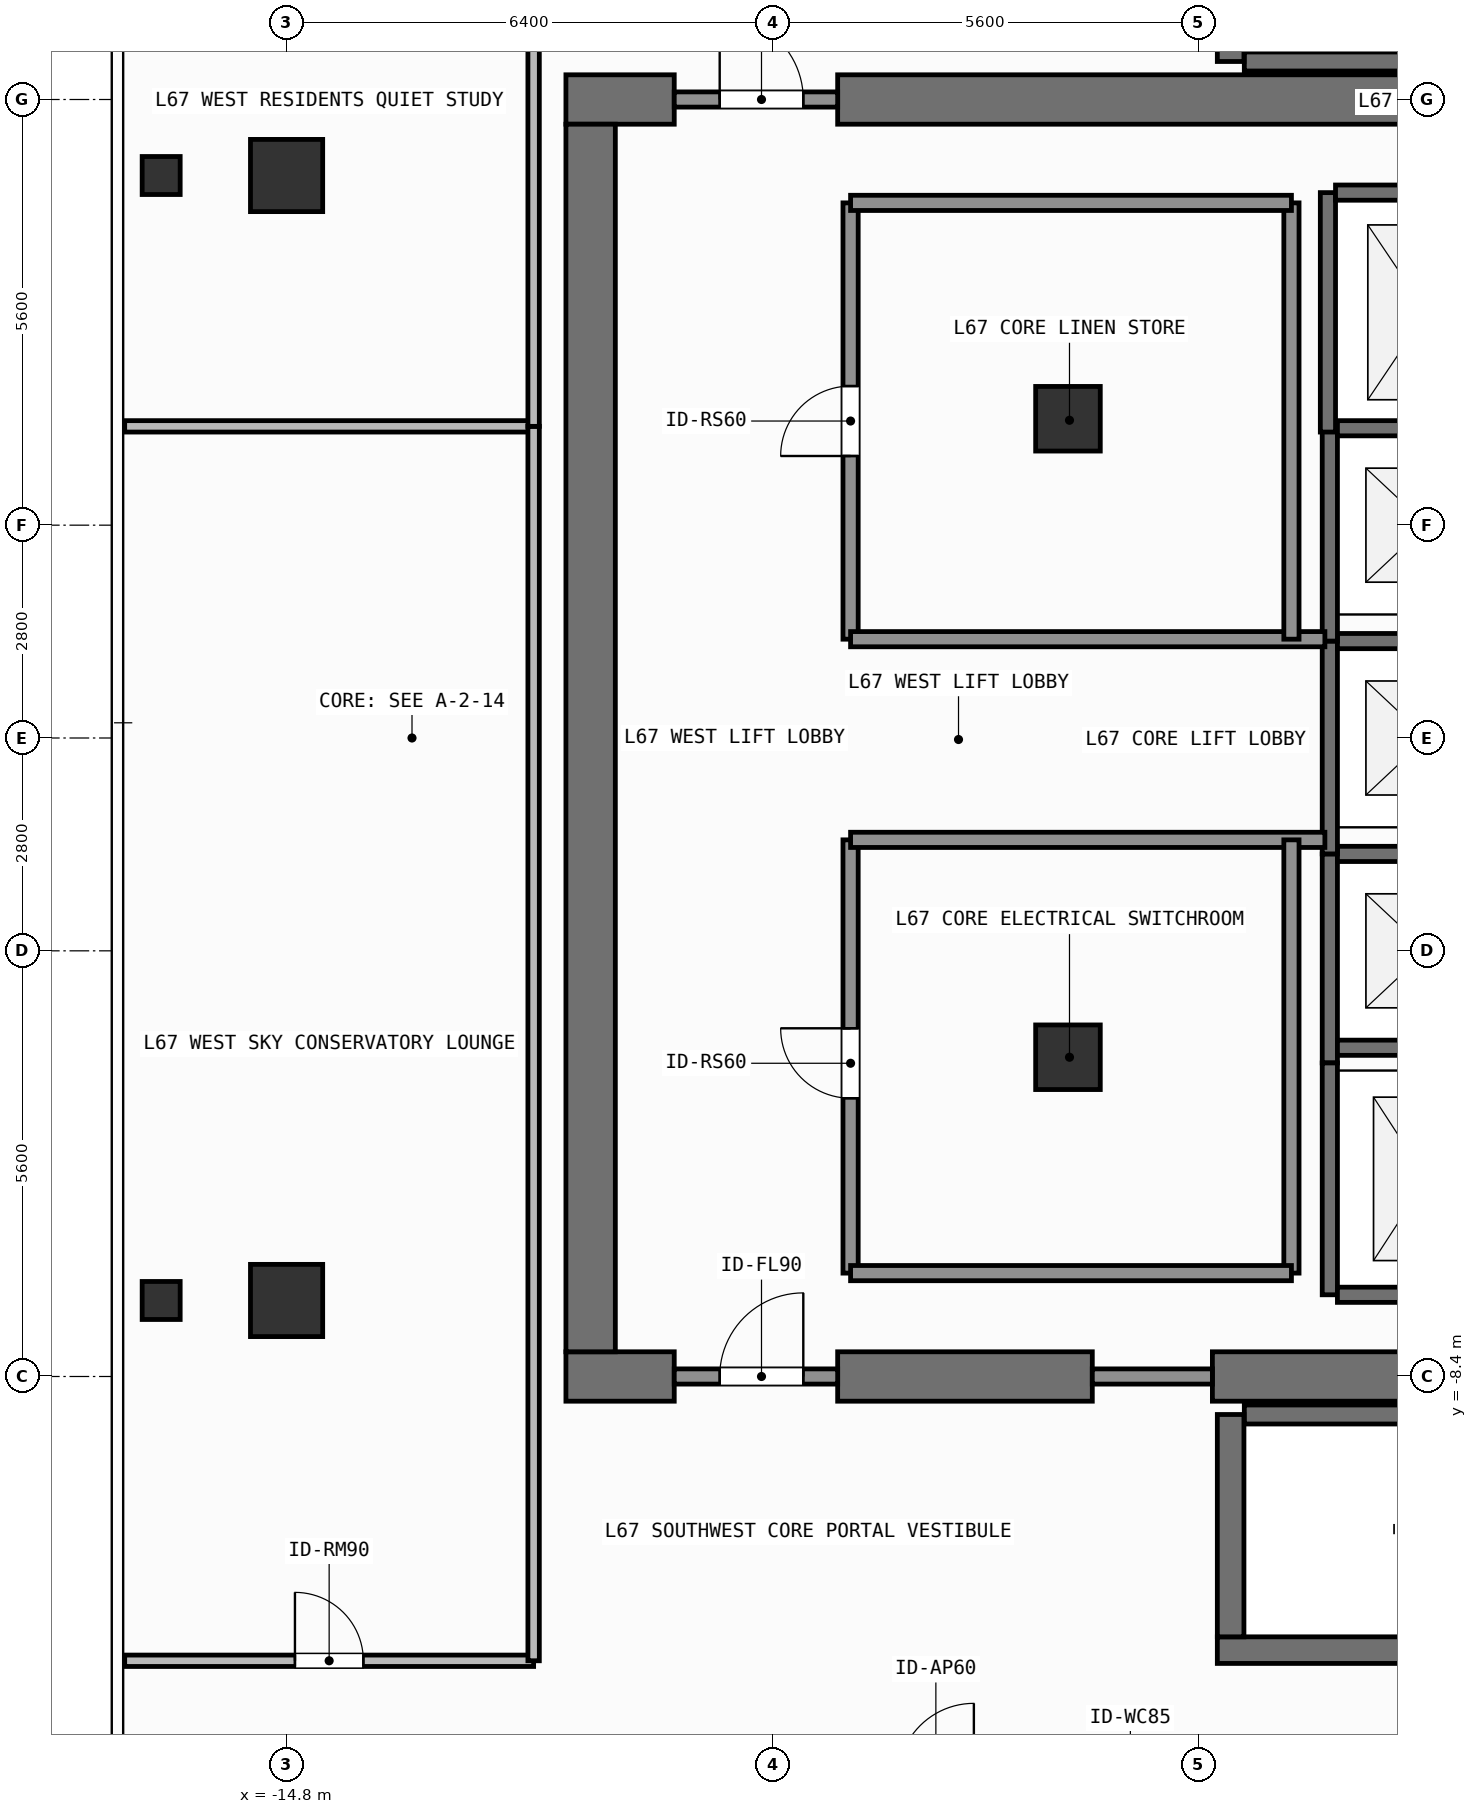
"""IFC4 building model, lengths in metres.
Left out: names, types, materials, properties, quantities, classifications, styles, units other than length and angle.
Written with IfcOpenShell. Run it as: python <this file> out.ifc"""

import sys

from ifc_helpers import new_model, si_unit, direction, frame, frame_2d, origin, origin_2d, place, context, subcontext, project, spatial, rectangle, hollow_rectangle, extrude, element, fill, save


model = new_model("IFC4")
c1 = context("Model", 3, precision=1e-05, world=origin(), true_north=direction((0.0, 1.0)))
c2 = subcontext(c1, "Body", "Model", "MODEL_VIEW")
j1 = project(units=[si_unit("LENGTHUNIT", "METRE"), si_unit("PLANEANGLEUNIT", "RADIAN")], contexts=[c1])
p1 = place(None, origin())
s1 = spatial("IfcSite", under=j1, at=p1, CompositionType="ELEMENT")
p2 = place(p1, origin())
s2 = spatial("IfcBuilding", under=s1, at=p2, CompositionType="ELEMENT")
p3 = place(p2, frame((0.0, 0.0, 274.2)))
s3 = spatial("IfcBuildingStorey", under=s2, at=p3, CompositionType="ELEMENT", Elevation=274.2)
p4 = place(p3, frame((-11.125, -8.4, 0.0), z_axis=(0.0, 0.0, 1.0), x_axis=(1.0, 0.0, 0.0)))
e1 = element("IfcWall", 1, at=p4, inside=s3, PredefinedType="SHEAR", context=c2, shape_type="SweptSolid", body=[
    extrude(rectangle(XDim=1.425, YDim=0.65, at=frame_2d((0.712, 0.0))), origin(), (0.0, 0.0, 1.0), 3.9),
])
p5 = place(p3, frame((-7.55, -8.4, 0.0), z_axis=(0.0, 0.0, 1.0), x_axis=(1.0, 0.0, 0.0)))
e2 = element("IfcWall", 2, at=p5, inside=s3, PredefinedType="SHEAR", context=c2, shape_type="SweptSolid", body=[
    extrude(rectangle(XDim=3.35, YDim=0.65, at=frame_2d((1.675, 0.0))), origin(), (0.0, 0.0, 1.0), 3.9),
])
p6 = place(p3, frame((-2.62, -8.4, 0.0), z_axis=(0.0, 0.0, 1.0), x_axis=(1.0, 0.0, 0.0)))
e3 = element("IfcWall", 3, at=p6, inside=s3, PredefinedType="SHEAR", context=c2, shape_type="SweptSolid", body=[
    extrude(rectangle(XDim=7.27, YDim=0.65, at=frame_2d((3.635, 0.0))), origin(), (0.0, 0.0, 1.0), 3.9),
])
p7 = place(p3, frame((-11.125, 8.4, 0.0), z_axis=(0.0, 0.0, 1.0), x_axis=(1.0, 0.0, 0.0)))
e4 = element("IfcWall", 4, at=p7, inside=s3, PredefinedType="SHEAR", context=c2, shape_type="SweptSolid", body=[
    extrude(rectangle(XDim=1.425, YDim=0.65, at=frame_2d((0.712, 0.0))), origin(), (0.0, 0.0, 1.0), 3.9),
])
p8 = place(p3, frame((-7.55, 8.4, 0.0), z_axis=(0.0, 0.0, 1.0), x_axis=(1.0, 0.0, 0.0)))
e5 = element("IfcWall", 5, at=p8, inside=s3, PredefinedType="SHEAR", context=c2, shape_type="SweptSolid", body=[
    extrude(rectangle(XDim=16.275, YDim=0.65, at=frame_2d((8.138, 0.0))), origin(), (0.0, 0.0, 1.0), 3.9),
])
p9 = place(p3, frame((-10.8, -8.075, 0.0), z_axis=(0.0, 0.0, 1.0), x_axis=(0.0, 1.0, 0.0)))
e6 = element("IfcWall", 6, at=p9, inside=s3, PredefinedType="SHEAR", context=c2, shape_type="SweptSolid", body=[
    extrude(rectangle(XDim=16.15, YDim=0.65, at=frame_2d((8.075, 0.0))), origin(), (0.0, 0.0, 1.0), 3.9),
])
p10 = place(p3, frame((-2.555, -12.0, 0.0), z_axis=(0.0, 0.0, 1.0), x_axis=(1.0, 0.0, 0.0)))
e7 = element("IfcWall", 7, at=p10, inside=s3, PredefinedType="SHEAR", context=c2, shape_type="SweptSolid", body=[
    extrude(rectangle(XDim=7.31, YDim=0.35, at=frame_2d((3.655, 0.0))), origin(), (0.0, 0.0, 1.0), 3.9),
])
p11 = place(p3, frame((-2.2, -8.9, 0.0), z_axis=(0.0, 0.0, 1.0), x_axis=(1.0, 0.0, 0.0)))
e8 = element("IfcWall", 8, at=p11, inside=s3, PredefinedType="SHEAR", context=c2, shape_type="SweptSolid", body=[
    extrude(rectangle(XDim=6.6, YDim=0.25, at=frame_2d((3.3, 0.0))), origin(), (0.0, 0.0, 1.0), 3.9),
])
p12 = place(p3, frame((-2.38, -11.825, 0.0), z_axis=(0.0, 0.0, 1.0), x_axis=(0.0, 1.0, 0.0)))
e9 = element("IfcWall", 9, at=p12, inside=s3, PredefinedType="SHEAR", context=c2, shape_type="SweptSolid", body=[
    extrude(rectangle(XDim=2.925, YDim=0.35, at=frame_2d((1.462, 0.0))), origin(), (0.0, 0.0, 1.0), 3.9),
])
p13 = place(p3, frame((-2.2, 8.9, 0.0), z_axis=(0.0, 0.0, 1.0), x_axis=(1.0, 0.0, 0.0)))
e10 = element("IfcWall", 10, at=p13, inside=s3, PredefinedType="SHEAR", context=c2, shape_type="SweptSolid", body=[
    extrude(rectangle(XDim=6.6, YDim=0.25, at=frame_2d((3.3, 0.0))), origin(), (0.0, 0.0, 1.0), 3.9),
])
p14 = place(p3, frame((-2.38, 8.9, 0.0), z_axis=(0.0, 0.0, 1.0), x_axis=(0.0, 1.0, 0.0)))
e11 = element("IfcWall", 11, at=p14, inside=s3, PredefinedType="SHEAR", context=c2, shape_type="SweptSolid", body=[
    extrude(rectangle(XDim=2.925, YDim=0.35, at=frame_2d((1.462, 0.0))), origin(), (0.0, 0.0, 1.0), 3.9),
])
for number, where, z_axis, x_axis in (
    (12, (-14.8, -7.4, 0.0), (0.0, 0.0, 1.0), (1.0, 0.0, 0.0)),
    (13, (-14.8, 7.4, 0.0), (0.0, 0.0, 1.0), (1.0, 0.0, 0.0)),
):
    element("IfcColumn", number, at=place(p3, frame(where, z_axis=z_axis, x_axis=x_axis)), inside=s3, PredefinedType="COLUMN", context=c2, shape_type="SweptSolid", body=[
        extrude(rectangle(XDim=0.95, YDim=0.95, at=origin_2d()), origin(), (0.0, 0.0, 1.0), 3.9),
    ])
for number, where, z_axis, x_axis in (
    (14, (-4.52, -4.2, 0.0), (0.0, 0.0, 1.0), (1.0, 0.0, 0.0)),
    (15, (-4.52, 4.2, 0.0), (0.0, 0.0, 1.0), (1.0, 0.0, 0.0)),
):
    element("IfcColumn", number, at=place(p3, frame(where, z_axis=z_axis, x_axis=x_axis)), inside=s3, PredefinedType="COLUMN", context=c2, shape_type="SweptSolid", body=[
        extrude(rectangle(XDim=0.85, YDim=0.85, at=origin_2d()), origin(), (0.0, 0.0, 1.0), 3.9),
    ])
for number, where, z_axis, x_axis in (
    (16, (-16.45, -7.4, 0.0), (0.0, 0.0, 1.0), (1.0, 0.0, 0.0)),
    (17, (-16.45, 7.4, 0.0), (0.0, 0.0, 1.0), (1.0, 0.0, 0.0)),
):
    element("IfcColumn", number, at=place(p3, frame(where, z_axis=z_axis, x_axis=x_axis)), inside=s3, PredefinedType="COLUMN", context=c2, shape_type="SweptSolid", body=[
        extrude(hollow_rectangle(XDim=0.5, YDim=0.5, WallThickness=0.025, at=origin_2d()), origin(), (0.0, 0.0, 1.0), 3.9),
    ])
p15 = place(p3, frame((-1.075, -4.275, 0.0), z_axis=(0.0, 0.0, 1.0), x_axis=(0.0, 1.0, 0.0)))
e18 = element("IfcWall", 18, at=p15, inside=s3, PredefinedType="SHEAR", context=c2, shape_type="SweptSolid", body=[
    extrude(rectangle(XDim=2.75, YDim=0.2, at=frame_2d((1.375, 0.0))), origin(), (0.0, 0.0, 1.0), 3.68),
])
for number, where, z_axis, x_axis in (
    (19, (-0.975, -4.075, 0.0), (0.0, 0.0, 1.0), (1.0, 0.0, 0.0)),
    (20, (-0.975, -1.525, 0.0), (0.0, 0.0, 1.0), (1.0, 0.0, 0.0)),
):
    element("IfcWall", number, at=place(p3, frame(where, z_axis=z_axis, x_axis=x_axis)), inside=s3, PredefinedType="SHEAR", context=c2, shape_type="SweptSolid", body=[
        extrude(rectangle(XDim=2.35, YDim=0.2, at=frame_2d((1.175, 0.0))), origin(), (0.0, 0.0, 1.0), 3.68),
    ])
p16 = place(p3, frame((-1.075, -1.525, 0.0), z_axis=(0.0, 0.0, 1.0), x_axis=(0.0, 1.0, 0.0)))
e21 = element("IfcWall", 21, at=p16, inside=s3, PredefinedType="SHEAR", context=c2, shape_type="SweptSolid", body=[
    extrude(rectangle(XDim=2.8, YDim=0.2, at=frame_2d((1.4, 0.0))), origin(), (0.0, 0.0, 1.0), 3.68),
])
p17 = place(p3, frame((-0.975, 1.275, 0.0), z_axis=(0.0, 0.0, 1.0), x_axis=(1.0, 0.0, 0.0)))
e22 = element("IfcWall", 22, at=p17, inside=s3, PredefinedType="SHEAR", context=c2, shape_type="SweptSolid", body=[
    extrude(rectangle(XDim=2.35, YDim=0.2, at=frame_2d((1.175, 0.0))), origin(), (0.0, 0.0, 1.0), 3.68),
])
p18 = place(p3, frame((-1.075, 1.275, 0.0), z_axis=(0.0, 0.0, 1.0), x_axis=(0.0, 1.0, 0.0)))
e23 = element("IfcWall", 23, at=p18, inside=s3, PredefinedType="SHEAR", context=c2, shape_type="SweptSolid", body=[
    extrude(rectangle(XDim=2.8, YDim=0.2, at=frame_2d((1.4, 0.0))), origin(), (0.0, 0.0, 1.0), 3.68),
])
p19 = place(p3, frame((-0.975, 4.075, 0.0), z_axis=(0.0, 0.0, 1.0), x_axis=(1.0, 0.0, 0.0)))
e24 = element("IfcWall", 24, at=p19, inside=s3, PredefinedType="SHEAR", context=c2, shape_type="SweptSolid", body=[
    extrude(rectangle(XDim=2.35, YDim=0.2, at=frame_2d((1.175, 0.0))), origin(), (0.0, 0.0, 1.0), 3.68),
])
p20 = place(p3, frame((-1.1, 4.025, 0.0), z_axis=(0.0, 0.0, 1.0), x_axis=(0.0, 1.0, 0.0)))
e25 = element("IfcWall", 25, at=p20, inside=s3, PredefinedType="SHEAR", context=c2, shape_type="SweptSolid", body=[
    extrude(rectangle(XDim=3.15, YDim=0.2, at=frame_2d((1.575, 0.0))), origin(), (0.0, 0.0, 1.0), 3.68),
])
p21 = place(p3, frame((-1.0, 7.175, 0.0), z_axis=(0.0, 0.0, 1.0), x_axis=(1.0, 0.0, 0.0)))
e26 = element("IfcWall", 26, at=p21, inside=s3, PredefinedType="SHEAR", context=c2, shape_type="SweptSolid", body=[
    extrude(rectangle(XDim=2.4, YDim=0.2, at=frame_2d((1.2, 0.0))), origin(), (0.0, 0.0, 1.0), 3.68),
])
p22 = place(p3, frame((-1.075, -7.325, 0.0), z_axis=(0.0, 0.0, 1.0), x_axis=(0.0, 1.0, 0.0)))
e27 = element("IfcWall", 27, at=p22, inside=s3, PredefinedType="SHEAR", context=c2, shape_type="SweptSolid", body=[
    extrude(rectangle(XDim=3.05, YDim=0.2, at=frame_2d((1.525, 0.0))), origin(), (0.0, 0.0, 1.0), 3.68),
])
p23 = place(p3, frame((-0.975, -7.325, 0.0), z_axis=(0.0, 0.0, 1.0), x_axis=(1.0, 0.0, 0.0)))
e28 = element("IfcWall", 28, at=p23, inside=s3, PredefinedType="SHEAR", context=c2, shape_type="SweptSolid", body=[
    extrude(rectangle(XDim=2.35, YDim=0.2, at=frame_2d((1.175, 0.0))), origin(), (0.0, 0.0, 1.0), 3.68),
])
p24 = place(p3, frame((-9.7, -8.4, 0.0), z_axis=(0.0, 0.0, 1.0), x_axis=(1.0, 0.0, 0.0)))
e29 = element("IfcWall", 29, at=p24, inside=s3, PredefinedType="SOLIDWALL", context=c2, shape_type="SweptSolid", body=[
    extrude(rectangle(XDim=2.15, YDim=0.2, at=frame_2d((1.075, 0.0))), origin(), (0.0, 0.0, 1.0), 2.92),
])
p25 = place(p24, frame((0.598, 0.0, 0.0)))
e30 = element("IfcOpeningElement", 30, at=p25, cuts=e29, PredefinedType="OPENING", context=c2, shape_type="SweptSolid", body=[
    extrude(rectangle(XDim=1.1, YDim=2.15, at=frame_2d((0.55, 1.075))), frame((0.0, 0.11, 0.0), z_axis=(0.0, -1.0, 0.0), x_axis=(1.0, 0.0, 0.0)), (0.0, 0.0, 1.0), 0.22),
])
p26 = place(p3, frame((-9.7, 8.4, 0.0), z_axis=(0.0, 0.0, 1.0), x_axis=(1.0, 0.0, 0.0)))
e31 = element("IfcWall", 31, at=p26, inside=s3, PredefinedType="SOLIDWALL", context=c2, shape_type="SweptSolid", body=[
    extrude(rectangle(XDim=2.15, YDim=0.2, at=frame_2d((1.075, 0.0))), origin(), (0.0, 0.0, 1.0), 2.92),
])
p27 = place(p26, frame((0.598, 0.0, 0.0)))
e32 = element("IfcOpeningElement", 32, at=p27, cuts=e31, PredefinedType="OPENING", context=c2, shape_type="SweptSolid", body=[
    extrude(rectangle(XDim=1.1, YDim=2.15, at=frame_2d((0.55, 1.075))), frame((0.0, 0.11, 0.0), z_axis=(0.0, -1.0, 0.0), x_axis=(1.0, 0.0, 0.0)), (0.0, 0.0, 1.0), 0.22),
])
p28 = place(p3, frame((-7.38, -7.04, 0.0), z_axis=(0.0, 0.0, 1.0), x_axis=(0.0, 1.0, 0.0)))
e33 = element("IfcWall", 33, at=p28, inside=s3, PredefinedType="SOLIDWALL", context=c2, shape_type="SweptSolid", body=[
    extrude(rectangle(XDim=5.7, YDim=0.2, at=frame_2d((2.85, 0.0))), origin(), (0.0, 0.0, 1.0), 3.68),
])
p29 = place(p28, frame((2.301, 0.0, 0.0)))
e34 = element("IfcOpeningElement", 34, at=p29, cuts=e33, PredefinedType="OPENING", context=c2, shape_type="SweptSolid", body=[
    extrude(rectangle(XDim=0.92, YDim=2.1, at=frame_2d((0.46, 1.05))), frame((0.0, 0.11, 0.0), z_axis=(0.0, -1.0, 0.0), x_axis=(1.0, 0.0, 0.0)), (0.0, 0.0, 1.0), 0.22),
])
p30 = place(p3, frame((-7.38, 1.3, 0.0), z_axis=(0.0, 0.0, 1.0), x_axis=(0.0, 1.0, 0.0)))
e35 = element("IfcWall", 35, at=p30, inside=s3, PredefinedType="SOLIDWALL", context=c2, shape_type="SweptSolid", body=[
    extrude(rectangle(XDim=5.74, YDim=0.2, at=frame_2d((2.87, 0.0))), origin(), (0.0, 0.0, 1.0), 3.68),
])
p31 = place(p30, frame((2.41, 0.0, 0.0)))
e36 = element("IfcOpeningElement", 36, at=p31, cuts=e35, PredefinedType="OPENING", context=c2, shape_type="SweptSolid", body=[
    extrude(rectangle(XDim=0.92, YDim=2.1, at=frame_2d((0.46, 1.05))), frame((0.0, 0.11, 0.0), z_axis=(0.0, -1.0, 0.0), x_axis=(1.0, 0.0, 0.0)), (0.0, 0.0, 1.0), 0.22),
])
p32 = place(p3, frame((-16.93, -12.14, 0.0), z_axis=(0.0, 0.0, 1.0), x_axis=(1.0, 0.0, 0.0)))
e37 = element("IfcWall", 37, at=p32, inside=s3, PredefinedType="PARTITIONING", context=c2, shape_type="SweptSolid", body=[
    extrude(rectangle(XDim=5.38, YDim=0.15, at=frame_2d((2.69, 0.0))), origin(), (0.0, 0.0, 1.0), 3.68),
])
p33 = place(p32, frame((2.24, 0.0, 0.0)))
e38 = element("IfcOpeningElement", 38, at=p33, cuts=e37, PredefinedType="OPENING", context=c2, shape_type="SweptSolid", body=[
    extrude(rectangle(XDim=0.9, YDim=2.1, at=frame_2d((0.45, 1.05))), frame((0.0, 0.085, 0.0), z_axis=(0.0, -1.0, 0.0), x_axis=(1.0, 0.0, 0.0)), (0.0, 0.0, 1.0), 0.17),
])
p34 = place(p3, frame((-4.2, -8.4, 0.0), z_axis=(0.0, 0.0, 1.0), x_axis=(1.0, 0.0, 0.0)))
e39 = element("IfcWall", 39, at=p34, inside=s3, PredefinedType="SOLIDWALL", context=c2, shape_type="SweptSolid", body=[
    extrude(rectangle(XDim=1.58, YDim=0.2, at=frame_2d((0.79, 0.0))), origin(), (0.0, 0.0, 1.0), 2.92),
])
for number, where, z_axis, x_axis in (
    (40, (-7.38, -1.34, 0.0), (0.0, 0.0, 1.0), (1.0, 0.0, 0.0)),
    (41, (-7.38, 1.3, 0.0), (0.0, 0.0, 1.0), (1.0, 0.0, 0.0)),
):
    element("IfcWall", number, at=place(p3, frame(where, z_axis=z_axis, x_axis=x_axis)), inside=s3, PredefinedType="SOLIDWALL", context=c2, shape_type="SweptSolid", body=[
        extrude(rectangle(XDim=6.24, YDim=0.2, at=frame_2d((3.12, 0.0))), origin(), (0.0, 0.0, 1.0), 3.68),
    ])
p35 = place(p3, frame((-1.58, -7.04, 0.0), z_axis=(0.0, 0.0, 1.0), x_axis=(0.0, 1.0, 0.0)))
e42 = element("IfcWall", 42, at=p35, inside=s3, PredefinedType="SOLIDWALL", context=c2, shape_type="SweptSolid", body=[
    extrude(rectangle(XDim=5.7, YDim=0.2, at=frame_2d((2.85, 0.0))), origin(), (0.0, 0.0, 1.0), 3.68),
])
p36 = place(p3, frame((-7.38, -7.04, 0.0), z_axis=(0.0, 0.0, 1.0), x_axis=(1.0, 0.0, 0.0)))
e43 = element("IfcWall", 43, at=p36, inside=s3, PredefinedType="SOLIDWALL", context=c2, shape_type="SweptSolid", body=[
    extrude(rectangle(XDim=5.8, YDim=0.2, at=frame_2d((2.9, 0.0))), origin(), (0.0, 0.0, 1.0), 3.68),
])
p37 = place(p3, frame((-1.58, 1.3, 0.0), z_axis=(0.0, 0.0, 1.0), x_axis=(0.0, 1.0, 0.0)))
e44 = element("IfcWall", 44, at=p37, inside=s3, PredefinedType="SOLIDWALL", context=c2, shape_type="SweptSolid", body=[
    extrude(rectangle(XDim=5.74, YDim=0.2, at=frame_2d((2.87, 0.0))), origin(), (0.0, 0.0, 1.0), 3.68),
])
p38 = place(p3, frame((-7.38, 7.04, 0.0), z_axis=(0.0, 0.0, 1.0), x_axis=(1.0, 0.0, 0.0)))
e45 = element("IfcWall", 45, at=p38, inside=s3, PredefinedType="SOLIDWALL", context=c2, shape_type="SweptSolid", body=[
    extrude(rectangle(XDim=5.8, YDim=0.2, at=frame_2d((2.9, 0.0))), origin(), (0.0, 0.0, 1.0), 3.68),
])
p39 = place(p3, frame((-16.93, 4.1, 0.0), z_axis=(0.0, 0.0, 1.0), x_axis=(1.0, 0.0, 0.0)))
e46 = element("IfcWall", 46, at=p39, inside=s3, PredefinedType="PARTITIONING", context=c2, shape_type="SweptSolid", body=[
    extrude(rectangle(XDim=5.38, YDim=0.15, at=frame_2d((2.69, 0.0))), origin(), (0.0, 0.0, 1.0), 3.68),
])
p40 = place(p3, frame((-11.55, -12.14, 0.0), z_axis=(0.0, 0.0, 1.0), x_axis=(0.0, 1.0, 0.0)))
e47 = element("IfcWall", 47, at=p40, inside=s3, PredefinedType="PARTITIONING", context=c2, shape_type="SweptSolid", body=[
    extrude(rectangle(XDim=16.24, YDim=0.15, at=frame_2d((8.12, 0.0))), origin(), (0.0, 0.0, 1.0), 3.68),
])
p41 = place(p3, frame((-11.55, 4.1, 0.0), z_axis=(0.0, 0.0, 1.0), x_axis=(0.0, 1.0, 0.0)))
e48 = element("IfcWall", 48, at=p41, inside=s3, PredefinedType="PARTITIONING", context=c2, shape_type="SweptSolid", body=[
    extrude(rectangle(XDim=8.04, YDim=0.15, at=frame_2d((4.02, 0.0))), origin(), (0.0, 0.0, 1.0), 3.68),
])
p42 = place(p25, origin())
e49 = element("IfcDoor", 49, at=p42, inside=s3, OperationType="SINGLE_SWING_RIGHT", PredefinedType="DOOR", context=c2, shape_type="SweptSolid", body=[
    extrude(rectangle(XDim=1.1, YDim=2.15, at=frame_2d((0.55, 1.075))), frame((0.0, 0.025, 0.0), z_axis=(0.0, -1.0, 0.0), x_axis=(1.0, 0.0, 0.0)), (0.0, 0.0, 1.0), 0.05),
])
fill(e30, e49)
p43 = place(p27, origin())
e50 = element("IfcDoor", 50, at=p43, inside=s3, OperationType="SINGLE_SWING_LEFT", PredefinedType="DOOR", context=c2, shape_type="SweptSolid", body=[
    extrude(rectangle(XDim=1.1, YDim=2.15, at=frame_2d((0.55, 1.075))), frame((0.0, 0.025, 0.0), z_axis=(0.0, -1.0, 0.0), x_axis=(1.0, 0.0, 0.0)), (0.0, 0.0, 1.0), 0.05),
])
fill(e32, e50)
p44 = place(p29, origin())
e51 = element("IfcDoor", 51, at=p44, inside=s3, OperationType="SINGLE_SWING_RIGHT", PredefinedType="DOOR", context=c2, shape_type="SweptSolid", body=[
    extrude(rectangle(XDim=0.92, YDim=2.1, at=frame_2d((0.46, 1.05))), frame((0.0, 0.025, 0.0), z_axis=(0.0, -1.0, 0.0), x_axis=(1.0, 0.0, 0.0)), (0.0, 0.0, 1.0), 0.05),
])
fill(e34, e51)
p45 = place(p31, origin())
e52 = element("IfcDoor", 52, at=p45, inside=s3, OperationType="SINGLE_SWING_LEFT", PredefinedType="DOOR", context=c2, shape_type="SweptSolid", body=[
    extrude(rectangle(XDim=0.92, YDim=2.1, at=frame_2d((0.46, 1.05))), frame((0.0, 0.025, 0.0), z_axis=(0.0, -1.0, 0.0), x_axis=(1.0, 0.0, 0.0)), (0.0, 0.0, 1.0), 0.05),
])
fill(e36, e52)
p46 = place(p33, origin())
e53 = element("IfcDoor", 53, at=p46, inside=s3, OperationType="SINGLE_SWING_LEFT", PredefinedType="DOOR", context=c2, shape_type="SweptSolid", body=[
    extrude(rectangle(XDim=0.9, YDim=2.1, at=frame_2d((0.45, 1.05))), frame((0.0, 0.025, 0.0), z_axis=(0.0, -1.0, 0.0), x_axis=(1.0, 0.0, 0.0)), (0.0, 0.0, 1.0), 0.05),
])
fill(e38, e53)
save(model, sys.argv[1])
